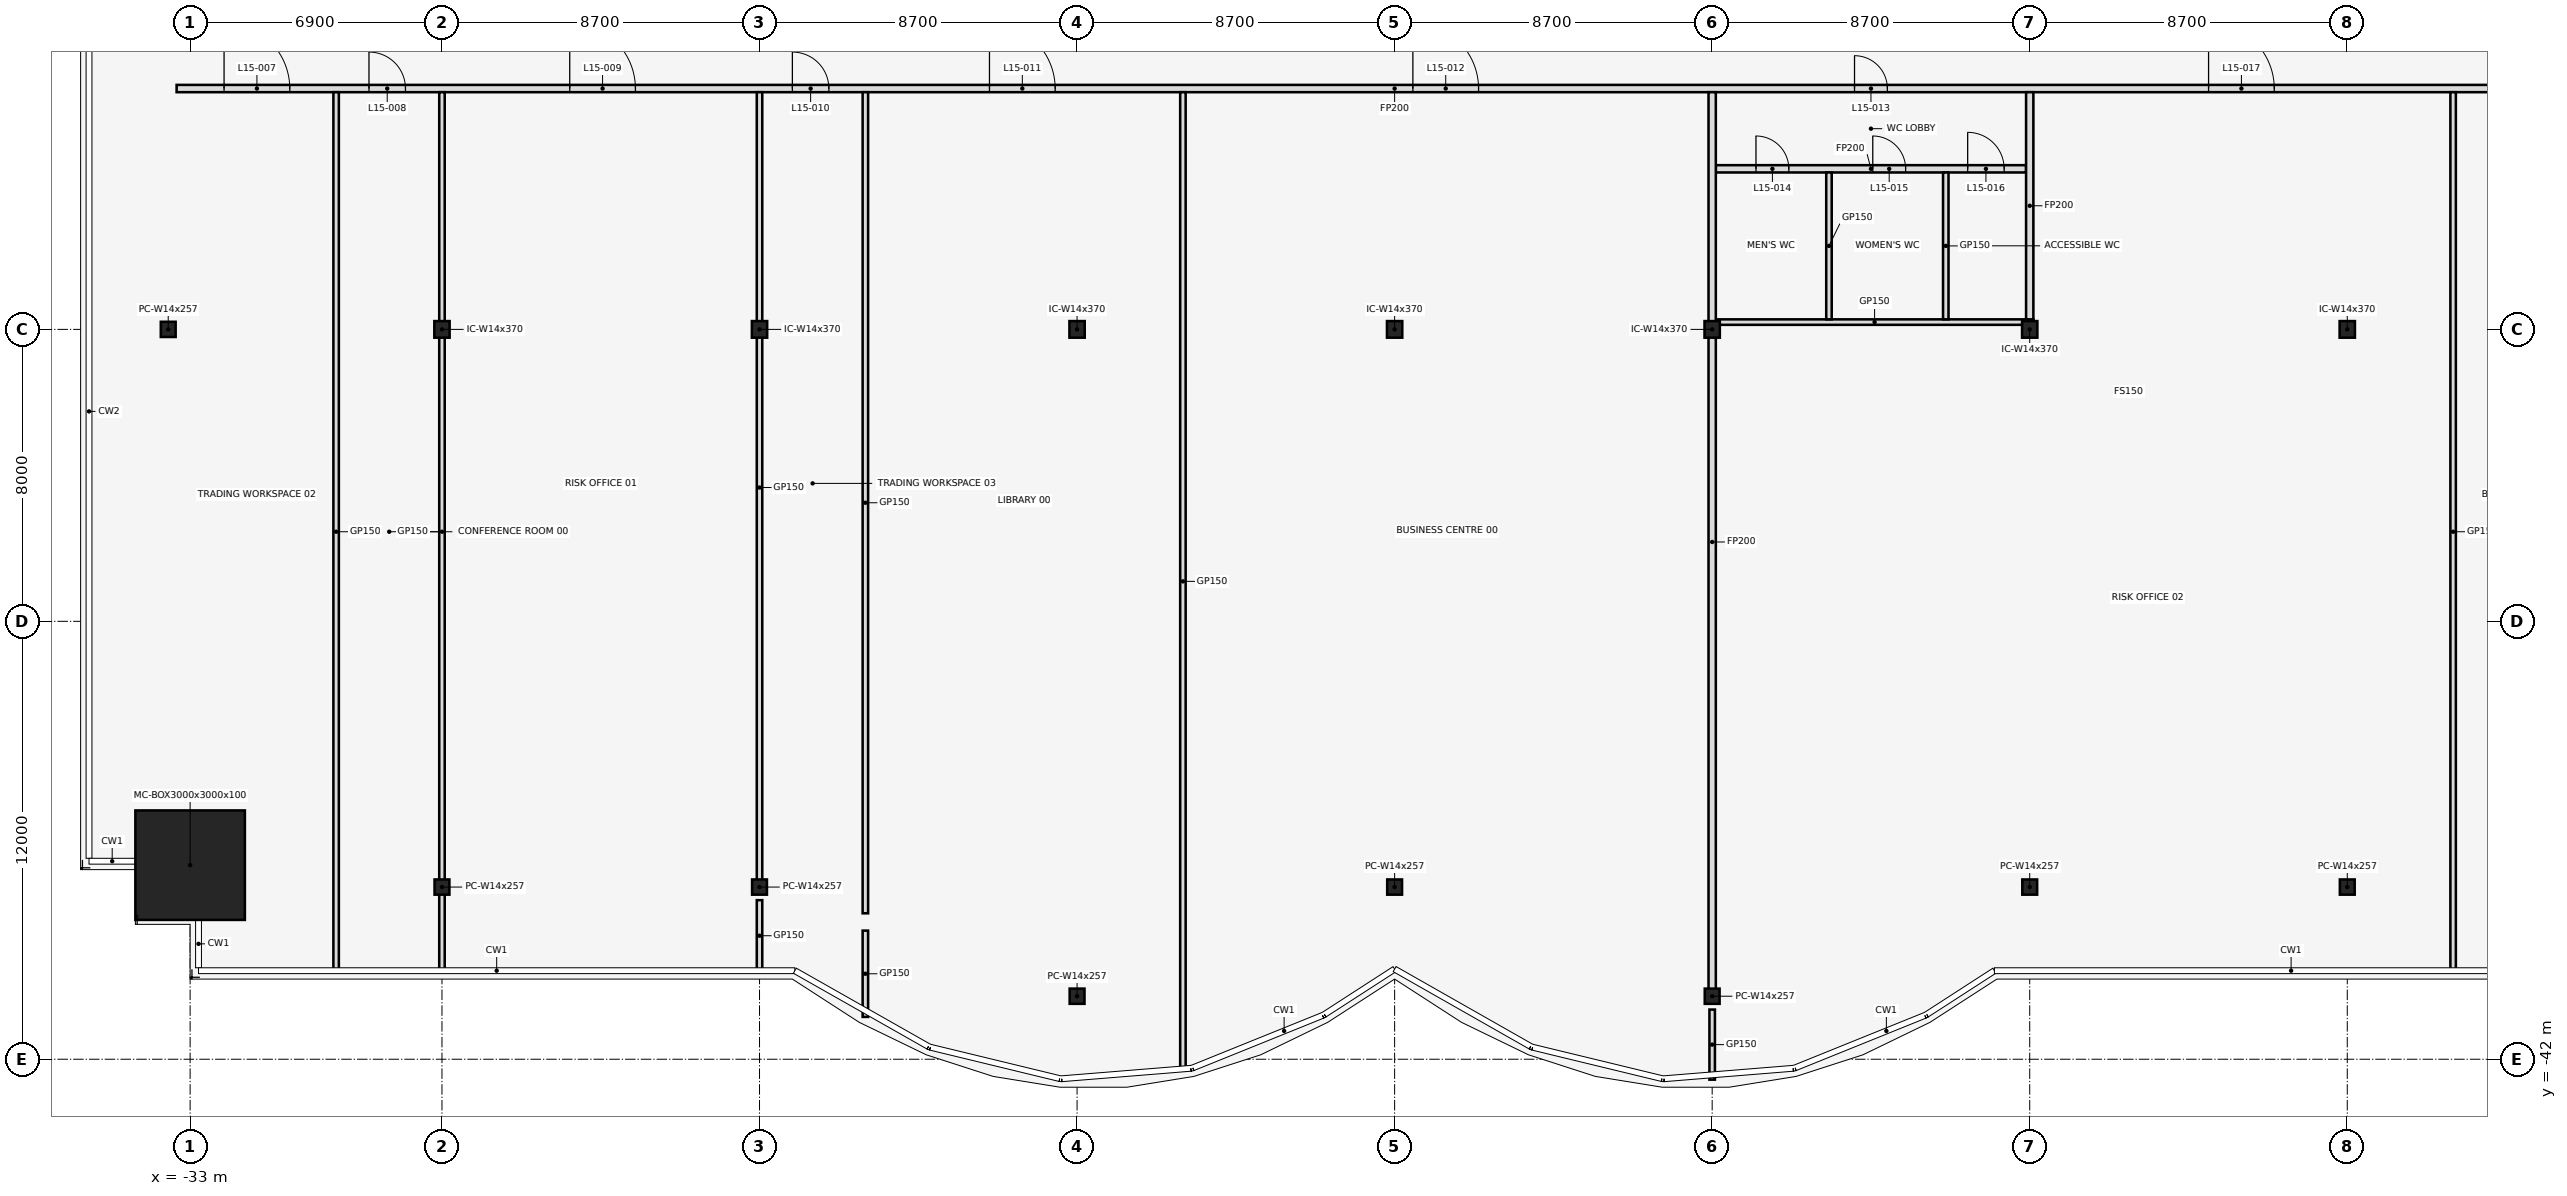
"""IFC4 building model, lengths in metres.
Left out: names, types, materials, properties, quantities, classifications, styles, units other than length and angle.
Written with IfcOpenShell. Run it as: python <this file> out.ifc"""

import sys

from ifc_helpers import new_model, si_unit, direction, frame, frame_2d, origin, origin_2d, place, context, subcontext, project, spatial, rectangle, hollow_rectangle, i_section, extrude, element, fill, save


model = new_model("IFC4")
c1 = context("Model", 3, precision=1e-05, world=origin(), true_north=direction((0.0, 1.0)))
c2 = subcontext(c1, "Body", "Model", "MODEL_VIEW")
j1 = project(units=[si_unit("LENGTHUNIT", "METRE"), si_unit("PLANEANGLEUNIT", "RADIAN")], contexts=[c1])
p1 = place(None, origin())
s1 = spatial("IfcSite", under=j1, at=p1, CompositionType="ELEMENT")
p2 = place(p1, origin())
s2 = spatial("IfcBuilding", under=s1, at=p2, CompositionType="ELEMENT")
p3 = place(p2, frame((0.0, 0.0, 75.5)))
s3 = spatial("IfcBuildingStorey", under=s2, at=p3, CompositionType="ELEMENT", Elevation=75.5)
p4 = place(p3, frame((-33.0, -36.682, 0.0), z_axis=(0.0, 0.0, 1.0), x_axis=(1.0, 0.0, 0.0)))
e1 = element("IfcColumn", 1, at=p4, inside=s3, PredefinedType="COLUMN", context=c2, shape_type="SweptSolid", body=[
    extrude(hollow_rectangle(XDim=3.0, YDim=3.0, WallThickness=0.1, at=origin_2d()), origin(), (0.0, 0.0, 1.0), 4.5),
])
for number, where, z_axis, x_axis in (
    (2, (-26.1, -37.282, 0.0), (0.0, 0.0, 1.0), (1.0, 0.0, 0.0)),
    (3, (-17.4, -37.282, 0.0), (0.0, 0.0, 1.0), (1.0, 0.0, 0.0)),
    (4, (-8.7, -40.273, 0.0), (0.0, 0.0, 1.0), (1.0, 0.0, 0.0)),
    (5, (0.0, -37.282, 0.0), (0.0, 0.0, 1.0), (1.0, 0.0, 0.0)),
    (6, (8.7, -40.273, 0.0), (0.0, 0.0, 1.0), (1.0, 0.0, 0.0)),
    (7, (17.4, -37.282, 0.0), (0.0, 0.0, 1.0), (1.0, 0.0, 0.0)),
    (8, (26.1, -37.282, 0.0), (0.0, 0.0, 1.0), (1.0, 0.0, 0.0)),
    (9, (-33.6, -22.0, 0.0), (0.0, 0.0, 1.0), (1.0, 0.0, 0.0)),
):
    element("IfcColumn", number, at=place(p3, frame(where, z_axis=z_axis, x_axis=x_axis)), inside=s3, PredefinedType="COLUMN", context=c2, shape_type="SweptSolid", body=[
        extrude(i_section(OverallWidth=0.406, OverallDepth=0.417, WebThickness=0.03, FlangeThickness=0.048, at=origin_2d()), origin(), (0.0, 0.0, 1.0), 4.5),
    ])
for number, where, z_axis, x_axis in (
    (10, (-26.1, -22.0, 0.0), (0.0, 0.0, 1.0), (1.0, 0.0, 0.0)),
    (11, (-17.4, -22.0, 0.0), (0.0, 0.0, 1.0), (1.0, 0.0, 0.0)),
    (12, (-8.7, -22.0, 0.0), (0.0, 0.0, 1.0), (1.0, 0.0, 0.0)),
    (13, (0.0, -22.0, 0.0), (0.0, 0.0, 1.0), (1.0, 0.0, 0.0)),
    (14, (8.7, -22.0, 0.0), (0.0, 0.0, 1.0), (1.0, 0.0, 0.0)),
    (15, (17.4, -22.0, 0.0), (0.0, 0.0, 1.0), (1.0, 0.0, 0.0)),
    (16, (26.1, -22.0, 0.0), (0.0, 0.0, 1.0), (1.0, 0.0, 0.0)),
):
    element("IfcColumn", number, at=place(p3, frame(where, z_axis=z_axis, x_axis=x_axis)), inside=s3, PredefinedType="COLUMN", context=c2, shape_type="SweptSolid", body=[
        extrude(i_section(OverallWidth=0.419, OverallDepth=0.455, WebThickness=0.042, FlangeThickness=0.068, at=origin_2d()), origin(), (0.0, 0.0, 1.0), 4.5),
    ])
p5 = place(p3, frame((8.8, -21.8, 0.0), z_axis=(0.0, 0.0, 1.0), x_axis=(1.0, 0.0, 0.0)))
e17 = element("IfcWall", 17, at=p5, inside=s3, PredefinedType="PARTITIONING", context=c2, shape_type="SweptSolid", body=[
    extrude(rectangle(XDim=8.7, YDim=0.15, at=frame_2d((4.35, 0.0))), origin(), (0.0, 0.0, 1.0), 3.339),
])
p6 = place(p3, frame((8.8, -17.6, 0.0), z_axis=(0.0, 0.0, 1.0), x_axis=(1.0, 0.0, 0.0)))
e18 = element("IfcWall", 18, at=p6, inside=s3, PredefinedType="PARTITIONING", context=c2, shape_type="SweptSolid", body=[
    extrude(rectangle(XDim=8.5, YDim=0.2, at=frame_2d((4.25, 0.0))), origin(), (0.0, 0.0, 1.0), 3.339),
])
p7 = place(p6, frame((1.1, 0.0, 0.0)))
e19 = element("IfcOpeningElement", 19, at=p7, cuts=e18, PredefinedType="OPENING", context=c2, shape_type="SweptSolid", body=[
    extrude(rectangle(XDim=0.9, YDim=2.1, at=frame_2d((0.45, 1.05))), frame((0.0, 0.112, 0.0), z_axis=(0.0, -1.0, 0.0), x_axis=(1.0, 0.0, 0.0)), (0.0, 0.0, 1.0), 0.224),
])
p8 = place(p6, frame((4.3, 0.0, 0.0)))
e20 = element("IfcOpeningElement", 20, at=p8, cuts=e18, PredefinedType="OPENING", context=c2, shape_type="SweptSolid", body=[
    extrude(rectangle(XDim=0.9, YDim=2.1, at=frame_2d((0.45, 1.05))), frame((0.0, 0.112, 0.0), z_axis=(0.0, -1.0, 0.0), x_axis=(1.0, 0.0, 0.0)), (0.0, 0.0, 1.0), 0.224),
])
p9 = place(p6, frame((6.9, 0.0, 0.0)))
e21 = element("IfcOpeningElement", 21, at=p9, cuts=e18, PredefinedType="OPENING", context=c2, shape_type="SweptSolid", body=[
    extrude(rectangle(XDim=1.0, YDim=2.1, at=frame_2d((0.5, 1.05))), frame((0.0, 0.112, 0.0), z_axis=(0.0, -1.0, 0.0), x_axis=(1.0, 0.0, 0.0)), (0.0, 0.0, 1.0), 0.224),
])
p10 = place(p3, frame((-33.37, -15.4, 0.0), z_axis=(0.0, 0.0, 1.0), x_axis=(1.0, 0.0, 0.0)))
e22 = element("IfcWall", 22, at=p10, inside=s3, PredefinedType="PARTITIONING", context=c2, shape_type="SweptSolid", body=[
    extrude(rectangle(XDim=66.74, YDim=0.2, at=frame_2d((33.37, 0.0))), origin(), (0.0, 0.0, 1.0), 3.339),
])
p11 = place(p10, frame((1.3, 0.0, 0.0)))
e23 = element("IfcOpeningElement", 23, at=p11, cuts=e22, PredefinedType="OPENING", context=c2, shape_type="SweptSolid", body=[
    extrude(rectangle(XDim=1.8, YDim=2.1, at=frame_2d((0.9, 1.05))), frame((0.0, 0.112, 0.0), z_axis=(0.0, -1.0, 0.0), x_axis=(1.0, 0.0, 0.0)), (0.0, 0.0, 1.0), 0.224),
])
p12 = place(p10, frame((5.27, 0.0, 0.0)))
e24 = element("IfcOpeningElement", 24, at=p12, cuts=e22, PredefinedType="OPENING", context=c2, shape_type="SweptSolid", body=[
    extrude(rectangle(XDim=1.0, YDim=2.1, at=frame_2d((0.5, 1.05))), frame((0.0, 0.112, 0.0), z_axis=(0.0, -1.0, 0.0), x_axis=(1.0, 0.0, 0.0)), (0.0, 0.0, 1.0), 0.224),
])
p13 = place(p10, frame((10.77, 0.0, 0.0)))
e25 = element("IfcOpeningElement", 25, at=p13, cuts=e22, PredefinedType="OPENING", context=c2, shape_type="SweptSolid", body=[
    extrude(rectangle(XDim=1.8, YDim=2.1, at=frame_2d((0.9, 1.05))), frame((0.0, 0.112, 0.0), z_axis=(0.0, -1.0, 0.0), x_axis=(1.0, 0.0, 0.0)), (0.0, 0.0, 1.0), 0.224),
])
p14 = place(p10, frame((16.87, 0.0, 0.0)))
e26 = element("IfcOpeningElement", 26, at=p14, cuts=e22, PredefinedType="OPENING", context=c2, shape_type="SweptSolid", body=[
    extrude(rectangle(XDim=1.0, YDim=2.1, at=frame_2d((0.5, 1.05))), frame((0.0, 0.112, 0.0), z_axis=(0.0, -1.0, 0.0), x_axis=(1.0, 0.0, 0.0)), (0.0, 0.0, 1.0), 0.224),
])
p15 = place(p10, frame((22.27, 0.0, 0.0)))
e27 = element("IfcOpeningElement", 27, at=p15, cuts=e22, PredefinedType="OPENING", context=c2, shape_type="SweptSolid", body=[
    extrude(rectangle(XDim=1.8, YDim=2.1, at=frame_2d((0.9, 1.05))), frame((0.0, 0.112, 0.0), z_axis=(0.0, -1.0, 0.0), x_axis=(1.0, 0.0, 0.0)), (0.0, 0.0, 1.0), 0.224),
])
p16 = place(p10, frame((33.87, 0.0, 0.0)))
e28 = element("IfcOpeningElement", 28, at=p16, cuts=e22, PredefinedType="OPENING", context=c2, shape_type="SweptSolid", body=[
    extrude(rectangle(XDim=1.8, YDim=2.1, at=frame_2d((0.9, 1.05))), frame((0.0, 0.112, 0.0), z_axis=(0.0, -1.0, 0.0), x_axis=(1.0, 0.0, 0.0)), (0.0, 0.0, 1.0), 0.224),
])
p17 = place(p10, frame((45.97, 0.0, 0.0)))
e29 = element("IfcOpeningElement", 29, at=p17, cuts=e22, PredefinedType="OPENING", context=c2, shape_type="SweptSolid", body=[
    extrude(rectangle(XDim=0.9, YDim=2.1, at=frame_2d((0.45, 1.05))), frame((0.0, 0.112, 0.0), z_axis=(0.0, -1.0, 0.0), x_axis=(1.0, 0.0, 0.0)), (0.0, 0.0, 1.0), 0.224),
])
p18 = place(p10, frame((55.67, 0.0, 0.0)))
e30 = element("IfcOpeningElement", 30, at=p18, cuts=e22, PredefinedType="OPENING", context=c2, shape_type="SweptSolid", body=[
    extrude(rectangle(XDim=1.8, YDim=2.1, at=frame_2d((0.9, 1.05))), frame((0.0, 0.112, 0.0), z_axis=(0.0, -1.0, 0.0), x_axis=(1.0, 0.0, 0.0)), (0.0, 0.0, 1.0), 0.224),
])
p19 = place(p10, frame((63.57, 0.0, 0.0)))
e31 = element("IfcOpeningElement", 31, at=p19, cuts=e22, PredefinedType="OPENING", context=c2, shape_type="SweptSolid", body=[
    extrude(rectangle(XDim=1.8, YDim=2.1, at=frame_2d((0.9, 1.05))), frame((0.0, 0.112, 0.0), z_axis=(0.0, -1.0, 0.0), x_axis=(1.0, 0.0, 0.0)), (0.0, 0.0, 1.0), 0.224),
])
for number, where, z_axis, x_axis in (
    (32, (-29.0, -39.59, 0.0), (0.0, 0.0, 1.0), (0.0, 1.0, 0.0)),
    (33, (-26.1, -39.59, 0.0), (0.0, 0.0, 1.0), (0.0, 1.0, 0.0)),
):
    element("IfcWall", number, at=place(p3, frame(where, z_axis=z_axis, x_axis=x_axis)), inside=s3, PredefinedType="PARTITIONING", context=c2, shape_type="SweptSolid", body=[
        extrude(rectangle(XDim=24.09, YDim=0.15, at=frame_2d((12.045, 0.0))), origin(), (0.0, 0.0, 1.0), 3.339),
    ])
p20 = place(p3, frame((-17.4, -39.59, 0.0), z_axis=(0.0, 0.0, 1.0), x_axis=(0.0, 1.0, 0.0)))
e34 = element("IfcWall", 34, at=p20, inside=s3, PredefinedType="PARTITIONING", context=c2, shape_type="SweptSolid", body=[
    extrude(rectangle(XDim=1.949, YDim=0.15, at=frame_2d((0.974, 0.0))), origin(), (0.0, 0.0, 1.0), 3.339),
])
p21 = place(p3, frame((-17.4, -37.167, 0.0), z_axis=(0.0, 0.0, 1.0), x_axis=(0.0, 1.0, 0.0)))
e35 = element("IfcWall", 35, at=p21, inside=s3, PredefinedType="PARTITIONING", context=c2, shape_type="SweptSolid", body=[
    extrude(rectangle(XDim=21.667, YDim=0.15, at=frame_2d((10.833, 0.0))), origin(), (0.0, 0.0, 1.0), 3.339),
])
p22 = place(p3, frame((-14.5, -40.84, 0.0), z_axis=(0.0, 0.0, 1.0), x_axis=(0.0, 1.0, 0.0)))
e36 = element("IfcWall", 36, at=p22, inside=s3, PredefinedType="PARTITIONING", context=c2, shape_type="SweptSolid", body=[
    extrude(rectangle(XDim=2.365, YDim=0.15, at=frame_2d((1.182, 0.0))), origin(), (0.0, 0.0, 1.0), 3.339),
])
p23 = place(p3, frame((-14.5, -38.001, 0.0), z_axis=(0.0, 0.0, 1.0), x_axis=(0.0, 1.0, 0.0)))
e37 = element("IfcWall", 37, at=p23, inside=s3, PredefinedType="PARTITIONING", context=c2, shape_type="SweptSolid", body=[
    extrude(rectangle(XDim=22.501, YDim=0.15, at=frame_2d((11.25, 0.0))), origin(), (0.0, 0.0, 1.0), 3.339),
])
p24 = place(p3, frame((-5.8, -42.31, 0.0), z_axis=(0.0, 0.0, 1.0), x_axis=(0.0, 1.0, 0.0)))
e38 = element("IfcWall", 38, at=p24, inside=s3, PredefinedType="PARTITIONING", context=c2, shape_type="SweptSolid", body=[
    extrude(rectangle(XDim=26.81, YDim=0.15, at=frame_2d((13.405, 0.0))), origin(), (0.0, 0.0, 1.0), 3.339),
])
p25 = place(p3, frame((8.7, -42.56, 0.0), z_axis=(0.0, 0.0, 1.0), x_axis=(0.0, 1.0, 0.0)))
e39 = element("IfcWall", 39, at=p25, inside=s3, PredefinedType="PARTITIONING", context=c2, shape_type="SweptSolid", body=[
    extrude(rectangle(XDim=1.921, YDim=0.15, at=frame_2d((0.96, 0.0))), origin(), (0.0, 0.0, 1.0), 3.339),
])
p26 = place(p3, frame((8.7, -40.151, 0.0), z_axis=(0.0, 0.0, 1.0), x_axis=(0.0, 1.0, 0.0)))
e40 = element("IfcWall", 40, at=p26, inside=s3, PredefinedType="PARTITIONING", context=c2, shape_type="SweptSolid", body=[
    extrude(rectangle(XDim=24.651, YDim=0.2, at=frame_2d((12.326, 0.0))), origin(), (0.0, 0.0, 1.0), 3.339),
])
for number, where, z_axis, x_axis in (
    (41, (11.9, -21.725, 0.0), (0.0, 0.0, 1.0), (0.0, 1.0, 0.0)),
    (42, (15.1, -21.725, 0.0), (0.0, 0.0, 1.0), (0.0, 1.0, 0.0)),
):
    element("IfcWall", number, at=place(p3, frame(where, z_axis=z_axis, x_axis=x_axis)), inside=s3, PredefinedType="PARTITIONING", context=c2, shape_type="SweptSolid", body=[
        extrude(rectangle(XDim=4.025, YDim=0.15, at=frame_2d((2.013, 0.0))), origin(), (0.0, 0.0, 1.0), 3.339),
    ])
p27 = place(p3, frame((17.4, -21.725, 0.0), z_axis=(0.0, 0.0, 1.0), x_axis=(0.0, 1.0, 0.0)))
e43 = element("IfcWall", 43, at=p27, inside=s3, PredefinedType="PARTITIONING", context=c2, shape_type="SweptSolid", body=[
    extrude(rectangle(XDim=6.225, YDim=0.2, at=frame_2d((3.113, 0.0))), origin(), (0.0, 0.0, 1.0), 3.339),
])
p28 = place(p3, frame((29.0, -39.59, 0.0), z_axis=(0.0, 0.0, 1.0), x_axis=(0.0, 1.0, 0.0)))
e44 = element("IfcWall", 44, at=p28, inside=s3, PredefinedType="PARTITIONING", context=c2, shape_type="SweptSolid", body=[
    extrude(rectangle(XDim=24.09, YDim=0.15, at=frame_2d((12.045, 0.0))), origin(), (0.0, 0.0, 1.0), 3.339),
])
p29 = place(p11, origin())
e45 = element("IfcDoor", 45, at=p29, inside=s3, OperationType="SINGLE_SWING_LEFT", PredefinedType="DOOR", context=c2, shape_type="SweptSolid", body=[
    extrude(rectangle(XDim=1.8, YDim=2.1, at=frame_2d((0.9, 1.05))), frame((0.0, 0.025, 0.0), z_axis=(0.0, -1.0, 0.0), x_axis=(1.0, 0.0, 0.0)), (0.0, 0.0, 1.0), 0.05),
])
fill(e23, e45)
p30 = place(p12, frame((1.0, 0.0, 0.0), z_axis=(0.0, 0.0, 1.0), x_axis=(-1.0, 0.0, 0.0)))
e46 = element("IfcDoor", 46, at=p30, inside=s3, OperationType="SINGLE_SWING_RIGHT", PredefinedType="DOOR", context=c2, shape_type="SweptSolid", body=[
    extrude(rectangle(XDim=1.0, YDim=2.1, at=frame_2d((0.5, 1.05))), frame((0.0, 0.025, 0.0), z_axis=(0.0, -1.0, 0.0), x_axis=(1.0, 0.0, 0.0)), (0.0, 0.0, 1.0), 0.05),
])
fill(e24, e46)
p31 = place(p13, origin())
e47 = element("IfcDoor", 47, at=p31, inside=s3, OperationType="SINGLE_SWING_LEFT", PredefinedType="DOOR", context=c2, shape_type="SweptSolid", body=[
    extrude(rectangle(XDim=1.8, YDim=2.1, at=frame_2d((0.9, 1.05))), frame((0.0, 0.025, 0.0), z_axis=(0.0, -1.0, 0.0), x_axis=(1.0, 0.0, 0.0)), (0.0, 0.0, 1.0), 0.05),
])
fill(e25, e47)
p32 = place(p14, frame((1.0, 0.0, 0.0), z_axis=(0.0, 0.0, 1.0), x_axis=(-1.0, 0.0, 0.0)))
e48 = element("IfcDoor", 48, at=p32, inside=s3, OperationType="SINGLE_SWING_LEFT", PredefinedType="DOOR", context=c2, shape_type="SweptSolid", body=[
    extrude(rectangle(XDim=1.0, YDim=2.1, at=frame_2d((0.5, 1.05))), frame((0.0, 0.025, 0.0), z_axis=(0.0, -1.0, 0.0), x_axis=(1.0, 0.0, 0.0)), (0.0, 0.0, 1.0), 0.05),
])
fill(e26, e48)
p33 = place(p15, origin())
e49 = element("IfcDoor", 49, at=p33, inside=s3, OperationType="SINGLE_SWING_LEFT", PredefinedType="DOOR", context=c2, shape_type="SweptSolid", body=[
    extrude(rectangle(XDim=1.8, YDim=2.1, at=frame_2d((0.9, 1.05))), frame((0.0, 0.025, 0.0), z_axis=(0.0, -1.0, 0.0), x_axis=(1.0, 0.0, 0.0)), (0.0, 0.0, 1.0), 0.05),
])
fill(e27, e49)
p34 = place(p16, origin())
e50 = element("IfcDoor", 50, at=p34, inside=s3, OperationType="SINGLE_SWING_LEFT", PredefinedType="DOOR", context=c2, shape_type="SweptSolid", body=[
    extrude(rectangle(XDim=1.8, YDim=2.1, at=frame_2d((0.9, 1.05))), frame((0.0, 0.025, 0.0), z_axis=(0.0, -1.0, 0.0), x_axis=(1.0, 0.0, 0.0)), (0.0, 0.0, 1.0), 0.05),
])
fill(e28, e50)
p35 = place(p17, frame((0.9, 0.0, 0.0), z_axis=(0.0, 0.0, 1.0), x_axis=(-1.0, 0.0, 0.0)))
e51 = element("IfcDoor", 51, at=p35, inside=s3, OperationType="SINGLE_SWING_LEFT", PredefinedType="DOOR", context=c2, shape_type="SweptSolid", body=[
    extrude(rectangle(XDim=0.9, YDim=2.1, at=frame_2d((0.45, 1.05))), frame((0.0, 0.025, 0.0), z_axis=(0.0, -1.0, 0.0), x_axis=(1.0, 0.0, 0.0)), (0.0, 0.0, 1.0), 0.05),
])
fill(e29, e51)
p36 = place(p7, frame((0.9, 0.0, 0.0), z_axis=(0.0, 0.0, 1.0), x_axis=(-1.0, 0.0, 0.0)))
e52 = element("IfcDoor", 52, at=p36, inside=s3, OperationType="SINGLE_SWING_RIGHT", PredefinedType="DOOR", context=c2, shape_type="SweptSolid", body=[
    extrude(rectangle(XDim=0.9, YDim=2.1, at=frame_2d((0.45, 1.05))), frame((0.0, 0.025, 0.0), z_axis=(0.0, -1.0, 0.0), x_axis=(1.0, 0.0, 0.0)), (0.0, 0.0, 1.0), 0.05),
])
fill(e19, e52)
p37 = place(p8, frame((0.9, 0.0, 0.0), z_axis=(0.0, 0.0, 1.0), x_axis=(-1.0, 0.0, 0.0)))
e53 = element("IfcDoor", 53, at=p37, inside=s3, OperationType="SINGLE_SWING_RIGHT", PredefinedType="DOOR", context=c2, shape_type="SweptSolid", body=[
    extrude(rectangle(XDim=0.9, YDim=2.1, at=frame_2d((0.45, 1.05))), frame((0.0, 0.025, 0.0), z_axis=(0.0, -1.0, 0.0), x_axis=(1.0, 0.0, 0.0)), (0.0, 0.0, 1.0), 0.05),
])
fill(e20, e53)
p38 = place(p9, frame((1.0, 0.0, 0.0), z_axis=(0.0, 0.0, 1.0), x_axis=(-1.0, 0.0, 0.0)))
e54 = element("IfcDoor", 54, at=p38, inside=s3, OperationType="SINGLE_SWING_LEFT", PredefinedType="DOOR", context=c2, shape_type="SweptSolid", body=[
    extrude(rectangle(XDim=1.0, YDim=2.1, at=frame_2d((0.5, 1.05))), frame((0.0, 0.025, 0.0), z_axis=(0.0, -1.0, 0.0), x_axis=(1.0, 0.0, 0.0)), (0.0, 0.0, 1.0), 0.05),
])
fill(e21, e54)
p39 = place(p18, origin())
e55 = element("IfcDoor", 55, at=p39, inside=s3, OperationType="SINGLE_SWING_LEFT", PredefinedType="DOOR", context=c2, shape_type="SweptSolid", body=[
    extrude(rectangle(XDim=1.8, YDim=2.1, at=frame_2d((0.9, 1.05))), frame((0.0, 0.025, 0.0), z_axis=(0.0, -1.0, 0.0), x_axis=(1.0, 0.0, 0.0)), (0.0, 0.0, 1.0), 0.05),
])
fill(e30, e55)
save(model, sys.argv[1])
